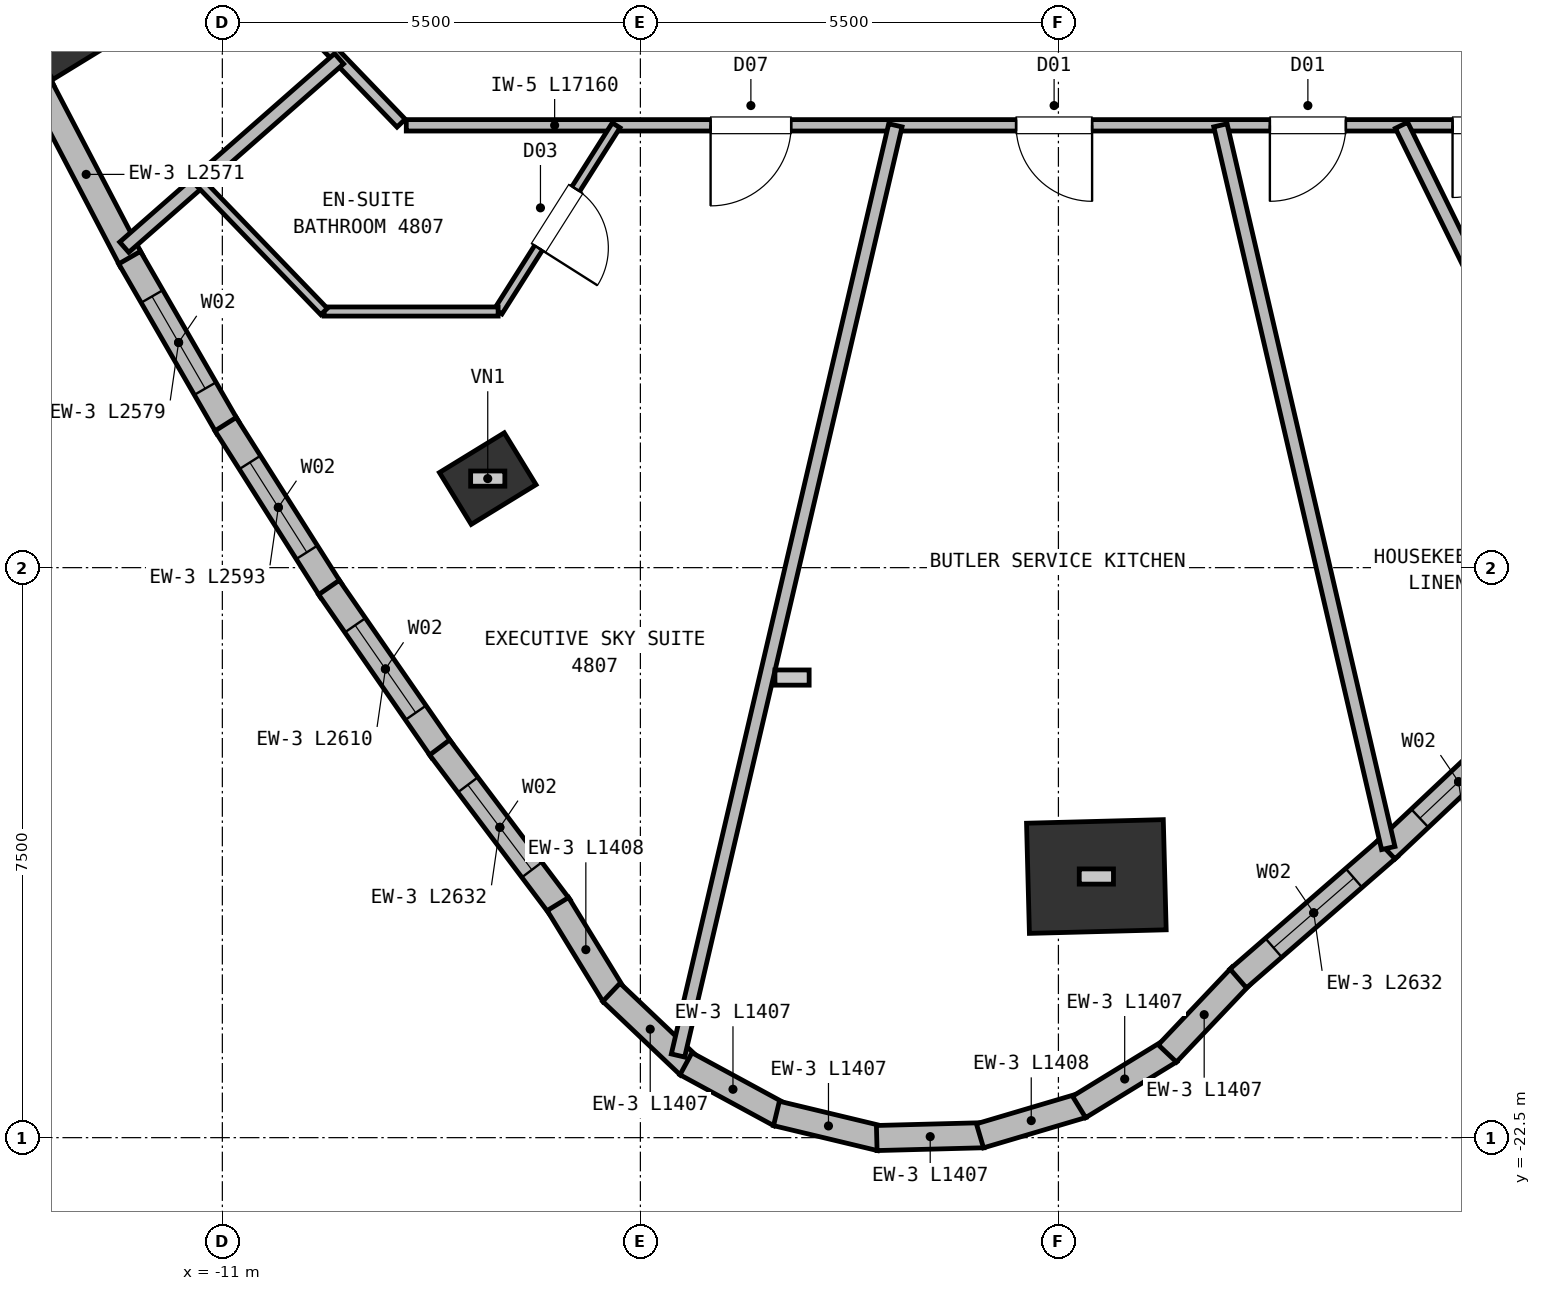
"""IFC4 building model, lengths in metres.
Left out: names, types, materials, properties, quantities, classifications, styles, units other than length and angle.
Written with IfcOpenShell. Run it as: python <this file> out.ifc"""

import sys

from ifc_helpers import new_model, si_unit, direction, frame, frame_2d, origin, origin_2d, place, context, subcontext, project, spatial, rectangle, extrude, element, fill, save


model = new_model("IFC4")
c1 = context("Model", 3, precision=1e-05, world=origin(), true_north=direction((0.0, 1.0)))
c2 = subcontext(c1, "Body", "Model", "MODEL_VIEW")
j1 = project(units=[si_unit("LENGTHUNIT", "METRE"), si_unit("PLANEANGLEUNIT", "RADIAN")], contexts=[c1])
p1 = place(None, origin())
s1 = spatial("IfcSite", under=j1, at=p1, CompositionType="ELEMENT")
p2 = place(p1, origin())
s2 = spatial("IfcBuilding", under=s1, at=p2, CompositionType="ELEMENT")
p3 = place(p2, frame((0.0, 0.0, 182.75)))
s3 = spatial("IfcBuildingStorey", under=s2, at=p3, CompositionType="ELEMENT", Elevation=182.75)
for number, where, z_axis, x_axis in (
    (1, (-13.012, -7.974, 0.0), (0.0, 0.0, 1.0), (-0.522, 0.853, 0.0)),
    (2, (-7.508, -13.828, 0.0), (0.0, 0.0, 1.0), (-0.522, 0.853, 0.0)),
):
    element("IfcColumn", number, at=place(p3, frame(where, z_axis=z_axis, x_axis=x_axis)), inside=s3, PredefinedType="COLUMN", context=c2, shape_type="SweptSolid", body=[
        extrude(rectangle(XDim=0.8, YDim=1.0, at=origin_2d()), origin(), (0.0, 0.0, 1.0), 3.8),
    ])
p4 = place(p3, frame((0.499, -19.064, 0.0), z_axis=(0.0, 0.0, 1.0), x_axis=(-0.026176948308, 0.999657324976, 0.0)))
e3 = element("IfcColumn", 3, at=p4, inside=s3, PredefinedType="COLUMN", context=c2, shape_type="SweptSolid", body=[
    extrude(rectangle(XDim=1.45, YDim=1.8, at=origin_2d()), origin(), (0.0, 0.0, 1.0), 3.8),
])
p5 = place(p3, frame((-13.365, -8.731, 0.0), z_axis=(0.0, 0.0, 1.0), x_axis=(-0.425774125911, 0.90482948322, 0.0)))
e4 = element("IfcWall", 4, at=p5, inside=s3, PredefinedType="SOLIDWALL", context=c2, shape_type="SweptSolid", body=[
    extrude(rectangle(XDim=2.566, YDim=0.33, at=frame_2d((1.283, 0.0))), origin(), (0.0, 0.0, 1.0), 3.55),
])
p6 = place(p3, frame((-12.196, -10.965, 0.0), z_axis=(0.0, 0.0, 1.0), x_axis=(-0.463361004434, 0.886169611062, 0.0)))
e5 = element("IfcWall", 5, at=p6, inside=s3, PredefinedType="SOLIDWALL", context=c2, shape_type="SweptSolid", body=[
    extrude(rectangle(XDim=2.571, YDim=0.33, at=frame_2d((1.285, 0.0))), origin(), (0.0, 0.0, 1.0), 3.55),
])
p7 = place(p3, frame((-10.931, -13.155, 0.0), z_axis=(0.0, 0.0, 1.0), x_axis=(-0.499875407217, 0.866097325513, 0.0)))
e6 = element("IfcWall", 6, at=p7, inside=s3, PredefinedType="SOLIDWALL", context=c2, shape_type="SweptSolid", body=[
    extrude(rectangle(XDim=2.579, YDim=0.33, at=frame_2d((1.29, 0.0))), origin(), (0.0, 0.0, 1.0), 3.55),
])
p8 = place(p7, frame((0.59, 0.0, 0.72)))
e7 = element("IfcOpeningElement", 7, at=p8, cuts=e6, PredefinedType="OPENING", context=c2, shape_type="SweptSolid", body=[
    extrude(rectangle(XDim=1.4, YDim=1.84, at=frame_2d((0.7, 0.92))), frame((0.0, 0.175, 0.0), z_axis=(0.0, -1.0, 0.0), x_axis=(1.0, 0.0, 0.0)), (0.0, 0.0, 1.0), 0.35),
])
p9 = place(p3, frame((-9.569, -15.302, 0.0), z_axis=(0.0, 0.0, 1.0), x_axis=(-0.535186500918, 0.844733928072, 0.0)))
e8 = element("IfcWall", 8, at=p9, inside=s3, PredefinedType="SOLIDWALL", context=c2, shape_type="SweptSolid", body=[
    extrude(rectangle(XDim=2.593, YDim=0.33, at=frame_2d((1.296, 0.0))), origin(), (0.0, 0.0, 1.0), 3.55),
])
p10 = place(p9, frame((0.596, 0.0, 0.72)))
e9 = element("IfcOpeningElement", 9, at=p10, cuts=e8, PredefinedType="OPENING", context=c2, shape_type="SweptSolid", body=[
    extrude(rectangle(XDim=1.4, YDim=1.84, at=frame_2d((0.7, 0.92))), frame((0.0, 0.175, 0.0), z_axis=(0.0, -1.0, 0.0), x_axis=(1.0, 0.0, 0.0)), (0.0, 0.0, 1.0), 0.35),
])
p11 = place(p3, frame((-8.112, -17.406, 0.0), z_axis=(0.0, 0.0, 1.0), x_axis=(-0.569122418308, 0.822252803571, 0.0)))
e10 = element("IfcWall", 10, at=p11, inside=s3, PredefinedType="SOLIDWALL", context=c2, shape_type="SweptSolid", body=[
    extrude(rectangle(XDim=2.61, YDim=0.33, at=frame_2d((1.305, 0.0))), origin(), (0.0, 0.0, 1.0), 3.55),
])
p12 = place(p11, frame((0.605, 0.0, 0.72)))
e11 = element("IfcOpeningElement", 11, at=p12, cuts=e10, PredefinedType="OPENING", context=c2, shape_type="SweptSolid", body=[
    extrude(rectangle(XDim=1.4, YDim=1.84, at=frame_2d((0.7, 0.92))), frame((0.0, 0.175, 0.0), z_axis=(0.0, -1.0, 0.0), x_axis=(1.0, 0.0, 0.0)), (0.0, 0.0, 1.0), 0.35),
])
p13 = place(p3, frame((-6.557, -19.468, 0.0), z_axis=(0.0, 0.0, 1.0), x_axis=(-0.601735324528, 0.798695561034, 0.0)))
e12 = element("IfcWall", 12, at=p13, inside=s3, PredefinedType="SOLIDWALL", context=c2, shape_type="SweptSolid", body=[
    extrude(rectangle(XDim=2.632, YDim=0.33, at=frame_2d((1.316, 0.0))), origin(), (0.0, 0.0, 1.0), 3.55),
])
p14 = place(p13, frame((0.616, 0.0, 0.72)))
e13 = element("IfcOpeningElement", 13, at=p14, cuts=e12, PredefinedType="OPENING", context=c2, shape_type="SweptSolid", body=[
    extrude(rectangle(XDim=1.4, YDim=1.84, at=frame_2d((0.7, 0.92))), frame((0.0, 0.175, 0.0), z_axis=(0.0, -1.0, 0.0), x_axis=(1.0, 0.0, 0.0)), (0.0, 0.0, 1.0), 0.35),
])
for number, where, z_axis, x_axis in (
    (14, (-5.85, -20.627, 0.0), (0.0, 0.0, 1.0), (-0.522, 0.853, 0.0)),
    (15, (-4.86, -21.557, 0.0), (0.0, 0.0, 1.0), (-0.725, 0.688, 0.0)),
):
    element("IfcWall", number, at=place(p3, frame(where, z_axis=z_axis, x_axis=x_axis)), inside=s3, PredefinedType="SOLIDWALL", context=c2, shape_type="SweptSolid", body=[
        extrude(rectangle(XDim=1.407, YDim=0.33, at=frame_2d((0.704, 0.0))), origin(), (0.0, 0.0, 1.0), 3.55),
    ])
p15 = place(p3, frame((-3.663, -22.199, 0.0), z_axis=(0.0, 0.0, 1.0), x_axis=(-0.878861744685, 0.477076549129, 0.0)))
e16 = element("IfcWall", 16, at=p15, inside=s3, PredefinedType="SOLIDWALL", context=c2, shape_type="SweptSolid", body=[
    extrude(rectangle(XDim=1.407, YDim=0.33, at=frame_2d((0.704, 0.0))), origin(), (0.0, 0.0, 1.0), 3.55),
])
for number, where, z_axis, x_axis in (
    (17, (-2.341, -22.51, 0.0), (0.0, 0.0, 1.0), (-0.972, 0.233, 0.0)),
    (18, (-0.983, -22.468, 0.0), (0.0, 0.0, 1.0), (-1.0, -0.026, 0.0)),
    (19, (0.317, -22.076, 0.0), (0.0, 0.0, 1.0), (-0.959, -0.284, 0.0)),
):
    element("IfcWall", number, at=place(p3, frame(where, z_axis=z_axis, x_axis=x_axis)), inside=s3, PredefinedType="SOLIDWALL", context=c2, shape_type="SweptSolid", body=[
        extrude(rectangle(XDim=1.407, YDim=0.33, at=frame_2d((0.704, 0.0))), origin(), (0.0, 0.0, 1.0), 3.55),
    ])
p16 = place(p3, frame((1.472, -21.361, 0.0), z_axis=(0.0, 0.0, 1.0), x_axis=(-0.852633662668, -0.522509174355, 0.0)))
e20 = element("IfcWall", 20, at=p16, inside=s3, PredefinedType="SOLIDWALL", context=c2, shape_type="SweptSolid", body=[
    extrude(rectangle(XDim=1.407, YDim=0.33, at=frame_2d((0.704, 0.0))), origin(), (0.0, 0.0, 1.0), 3.55),
])
p17 = place(p3, frame((2.402, -20.371, 0.0), z_axis=(0.0, 0.0, 1.0), x_axis=(-0.688302566146, -0.725423722687, 0.0)))
e21 = element("IfcWall", 21, at=p17, inside=s3, PredefinedType="SOLIDWALL", context=c2, shape_type="SweptSolid", body=[
    extrude(rectangle(XDim=1.407, YDim=0.33, at=frame_2d((0.704, 0.0))), origin(), (0.0, 0.0, 1.0), 3.55),
])
p18 = place(p3, frame((4.352, -18.679, 0.0), z_axis=(0.0, 0.0, 1.0), x_axis=(-0.754647459821, -0.656130483505, 0.0)))
e22 = element("IfcWall", 22, at=p18, inside=s3, PredefinedType="SOLIDWALL", context=c2, shape_type="SweptSolid", body=[
    extrude(rectangle(XDim=2.632, YDim=0.33, at=frame_2d((1.316, 0.0))), origin(), (0.0, 0.0, 1.0), 3.55),
])
p19 = place(p18, frame((0.616, 0.0, 0.72)))
e23 = element("IfcOpeningElement", 23, at=p19, cuts=e22, PredefinedType="OPENING", context=c2, shape_type="SweptSolid", body=[
    extrude(rectangle(XDim=1.4, YDim=1.84, at=frame_2d((0.7, 0.92))), frame((0.0, 0.175, 0.0), z_axis=(0.0, -1.0, 0.0), x_axis=(1.0, 0.0, 0.0)), (0.0, 0.0, 1.0), 0.35),
])
p20 = place(p3, frame((6.215, -16.922, 0.0), z_axis=(0.0, 0.0, 1.0), x_axis=(-0.72774946529, -0.685843069346, 0.0)))
e24 = element("IfcWall", 24, at=p20, inside=s3, PredefinedType="SOLIDWALL", context=c2, shape_type="SweptSolid", body=[
    extrude(rectangle(XDim=2.61, YDim=0.33, at=frame_2d((1.305, 0.0))), origin(), (0.0, 0.0, 1.0), 3.55),
])
p21 = place(p20, frame((0.605, 0.0, 0.72)))
e25 = element("IfcOpeningElement", 25, at=p21, cuts=e24, PredefinedType="OPENING", context=c2, shape_type="SweptSolid", body=[
    extrude(rectangle(XDim=1.4, YDim=1.84, at=frame_2d((0.7, 0.92))), frame((0.0, 0.175, 0.0), z_axis=(0.0, -1.0, 0.0), x_axis=(1.0, 0.0, 0.0)), (0.0, 0.0, 1.0), 0.35),
])
p22 = place(p3, frame((8.58, -9.18, 0.0), z_axis=(0.0, 0.0, 1.0), x_axis=(-1.0, 0.0, 0.0)))
e26 = element("IfcWall", 26, at=p22, inside=s3, PredefinedType="PARTITIONING", context=c2, shape_type="SweptSolid", body=[
    extrude(rectangle(XDim=17.16, YDim=0.15, at=frame_2d((8.58, 0.0))), origin(), (0.0, 0.0, 1.0), 3.23),
])
p23 = place(p22, frame((2.444, 0.0, 0.0)))
e27 = element("IfcOpeningElement", 27, at=p23, cuts=e26, PredefinedType="OPENING", context=c2, shape_type="SweptSolid", body=[
    extrude(rectangle(XDim=0.95, YDim=2.1, at=frame_2d((0.475, 1.05))), frame((0.0, 0.085, 0.0), z_axis=(0.0, -1.0, 0.0), x_axis=(1.0, 0.0, 0.0)), (0.0, 0.0, 1.0), 0.17),
])
p24 = place(p22, frame((4.798, 0.0, 0.0)))
e28 = element("IfcOpeningElement", 28, at=p24, cuts=e26, PredefinedType="OPENING", context=c2, shape_type="SweptSolid", body=[
    extrude(rectangle(XDim=1.0, YDim=2.15, at=frame_2d((0.5, 1.075))), frame((0.0, 0.085, 0.0), z_axis=(0.0, -1.0, 0.0), x_axis=(1.0, 0.0, 0.0)), (0.0, 0.0, 1.0), 0.17),
])
p25 = place(p22, frame((12.096, 0.0, 0.0)))
e29 = element("IfcOpeningElement", 29, at=p25, cuts=e26, PredefinedType="OPENING", context=c2, shape_type="SweptSolid", body=[
    extrude(rectangle(XDim=1.06, YDim=2.15, at=frame_2d((0.53, 1.075))), frame((0.0, 0.085, 0.0), z_axis=(0.0, -1.0, 0.0), x_axis=(1.0, 0.0, 0.0)), (0.0, 0.0, 1.0), 0.17),
])
p26 = place(p22, frame((8.137, 0.0, 0.0)))
e30 = element("IfcOpeningElement", 30, at=p26, cuts=e26, PredefinedType="OPENING", context=c2, shape_type="SweptSolid", body=[
    extrude(rectangle(XDim=1.0, YDim=2.15, at=frame_2d((0.5, 1.075))), frame((0.0, 0.085, 0.0), z_axis=(0.0, -1.0, 0.0), x_axis=(1.0, 0.0, 0.0)), (0.0, 0.0, 1.0), 0.17),
])
p27 = place(p3, frame((-8.648, -9.151, 0.0), z_axis=(0.0, 0.0, 1.0), x_axis=(-0.693764562202, 0.720201869085, 0.0)))
e31 = element("IfcWall", 31, at=p27, inside=s3, PredefinedType="PARTITIONING", context=c2, shape_type="SweptSolid", body=[
    extrude(rectangle(XDim=2.558, YDim=0.15, at=frame_2d((1.279, 0.0))), origin(), (0.0, 0.0, 1.0), 3.23),
])
p28 = place(p3, frame((-9.464, -8.304, 0.0), z_axis=(0.0, 0.0, 1.0), x_axis=(-0.751699255643, -0.659506049302, 0.0)))
e32 = element("IfcWall", 32, at=p28, inside=s3, PredefinedType="PARTITIONING", context=c2, shape_type="SweptSolid", body=[
    extrude(rectangle(XDim=3.76, YDim=0.18, at=frame_2d((1.88, 0.0))), origin(), (0.0, 0.0, 1.0), 3.55),
])
p29 = place(p3, frame((-5.819, -9.18, 0.0), z_axis=(0.0, 0.0, 1.0), x_axis=(-0.535382431743, -0.844609763015, 0.0)))
e33 = element("IfcWall", 33, at=p29, inside=s3, PredefinedType="PARTITIONING", context=c2, shape_type="SweptSolid", body=[
    extrude(rectangle(XDim=2.901, YDim=0.12, at=frame_2d((1.45, 0.0))), origin(), (0.0, 0.0, 1.0), 3.55),
])
p30 = place(p29, frame((0.99, 0.0, 0.0)))
e34 = element("IfcOpeningElement", 34, at=p30, cuts=e33, PredefinedType="OPENING", context=c2, shape_type="SweptSolid", body=[
    extrude(rectangle(XDim=0.92, YDim=2.1, at=frame_2d((0.46, 1.05))), frame((0.0, 0.07, 0.0), z_axis=(0.0, -1.0, 0.0), x_axis=(1.0, 0.0, 0.0)), (0.0, 0.0, 1.0), 0.14),
])
p31 = place(p3, frame((-7.372, -11.63, 0.0), z_axis=(0.0, 0.0, 1.0), x_axis=(-1.0, 0.0, 0.0)))
e35 = element("IfcWall", 35, at=p31, inside=s3, PredefinedType="PARTITIONING", context=c2, shape_type="SweptSolid", body=[
    extrude(rectangle(XDim=2.29, YDim=0.12, at=frame_2d((1.145, 0.0))), origin(), (0.0, 0.0, 1.0), 3.55),
])
p32 = place(p3, frame((-11.308, -9.921, 0.0), z_axis=(0.0, 0.0, 1.0), x_axis=(0.693706945125, -0.7202573667, 0.0)))
e36 = element("IfcWall", 36, at=p32, inside=s3, PredefinedType="PARTITIONING", context=c2, shape_type="SweptSolid", body=[
    extrude(rectangle(XDim=2.372, YDim=0.12, at=frame_2d((1.186, 0.0))), origin(), (0.0, 0.0, 1.0), 2.63),
])
p33 = place(p3, frame((-2.145, -9.18, 0.0), z_axis=(0.0, 0.0, 1.0), x_axis=(-0.22755258656, -0.973765793376, 0.0)))
e37 = element("IfcWall", 37, at=p33, inside=s3, PredefinedType="PARTITIONING", context=c2, shape_type="SweptSolid", body=[
    extrude(rectangle(XDim=12.569, YDim=0.18, at=frame_2d((6.285, 0.0))), origin(), (0.0, 0.0, 1.0), 3.55),
])
p34 = place(p3, frame((2.132, -9.18, 0.0), z_axis=(0.0, 0.0, 1.0), x_axis=(0.226196232917, -0.974081754379, 0.0)))
e38 = element("IfcWall", 38, at=p34, inside=s3, PredefinedType="PARTITIONING", context=c2, shape_type="SweptSolid", body=[
    extrude(rectangle(XDim=9.762, YDim=0.18, at=frame_2d((4.881, 0.0))), origin(), (0.0, 0.0, 1.0), 3.55),
])
p35 = place(p3, frame((4.514, -9.18, 0.0), z_axis=(0.0, 0.0, 1.0), x_axis=(0.441285267702, -0.897366877319, 0.0)))
e39 = element("IfcWall", 39, at=p35, inside=s3, PredefinedType="PARTITIONING", context=c2, shape_type="SweptSolid", body=[
    extrude(rectangle(XDim=7.029, YDim=0.18, at=frame_2d((3.515, 0.0))), origin(), (0.0, 0.0, 1.0), 3.55),
])
p36 = place(p8, origin())
e40 = element("IfcWindow", 40, at=p36, inside=s3, PartitioningType="SINGLE_PANEL", PredefinedType="WINDOW", context=c2, shape_type="SweptSolid", body=[
    extrude(rectangle(XDim=1.4, YDim=1.84, at=frame_2d((0.7, 0.92))), frame((0.0, 0.03, 0.0), z_axis=(0.0, -1.0, 0.0), x_axis=(1.0, 0.0, 0.0)), (0.0, 0.0, 1.0), 0.06),
])
fill(e7, e40)
p37 = place(p10, origin())
e41 = element("IfcWindow", 41, at=p37, inside=s3, PartitioningType="SINGLE_PANEL", PredefinedType="WINDOW", context=c2, shape_type="SweptSolid", body=[
    extrude(rectangle(XDim=1.4, YDim=1.84, at=frame_2d((0.7, 0.92))), frame((0.0, 0.03, 0.0), z_axis=(0.0, -1.0, 0.0), x_axis=(1.0, 0.0, 0.0)), (0.0, 0.0, 1.0), 0.06),
])
fill(e9, e41)
p38 = place(p12, origin())
e42 = element("IfcWindow", 42, at=p38, inside=s3, PartitioningType="SINGLE_PANEL", PredefinedType="WINDOW", context=c2, shape_type="SweptSolid", body=[
    extrude(rectangle(XDim=1.4, YDim=1.84, at=frame_2d((0.7, 0.92))), frame((0.0, 0.03, 0.0), z_axis=(0.0, -1.0, 0.0), x_axis=(1.0, 0.0, 0.0)), (0.0, 0.0, 1.0), 0.06),
])
fill(e11, e42)
p39 = place(p14, origin())
e43 = element("IfcWindow", 43, at=p39, inside=s3, PartitioningType="SINGLE_PANEL", PredefinedType="WINDOW", context=c2, shape_type="SweptSolid", body=[
    extrude(rectangle(XDim=1.4, YDim=1.84, at=frame_2d((0.7, 0.92))), frame((0.0, 0.03, 0.0), z_axis=(0.0, -1.0, 0.0), x_axis=(1.0, 0.0, 0.0)), (0.0, 0.0, 1.0), 0.06),
])
fill(e13, e43)
p40 = place(p19, origin())
e44 = element("IfcWindow", 44, at=p40, inside=s3, PartitioningType="SINGLE_PANEL", PredefinedType="WINDOW", context=c2, shape_type="SweptSolid", body=[
    extrude(rectangle(XDim=1.4, YDim=1.84, at=frame_2d((0.7, 0.92))), frame((0.0, 0.03, 0.0), z_axis=(0.0, -1.0, 0.0), x_axis=(1.0, 0.0, 0.0)), (0.0, 0.0, 1.0), 0.06),
])
fill(e23, e44)
p41 = place(p21, origin())
e45 = element("IfcWindow", 45, at=p41, inside=s3, PartitioningType="SINGLE_PANEL", PredefinedType="WINDOW", context=c2, shape_type="SweptSolid", body=[
    extrude(rectangle(XDim=1.4, YDim=1.84, at=frame_2d((0.7, 0.92))), frame((0.0, 0.03, 0.0), z_axis=(0.0, -1.0, 0.0), x_axis=(1.0, 0.0, 0.0)), (0.0, 0.0, 1.0), 0.06),
])
fill(e25, e45)
p42 = place(p30, origin())
e46 = element("IfcDoor", 46, at=p42, inside=s3, OperationType="SINGLE_SWING_RIGHT", PredefinedType="DOOR", context=c2, shape_type="SweptSolid", body=[
    extrude(rectangle(XDim=0.92, YDim=2.1, at=frame_2d((0.46, 1.05))), frame((0.0, 0.025, 0.0), z_axis=(0.0, -1.0, 0.0), x_axis=(1.0, 0.0, 0.0)), (0.0, 0.0, 1.0), 0.05),
])
fill(e34, e46)
p43 = place(p23, origin())
e47 = element("IfcDoor", 47, at=p43, inside=s3, OperationType="SINGLE_SWING_RIGHT", PredefinedType="DOOR", context=c2, shape_type="SweptSolid", body=[
    extrude(rectangle(XDim=0.95, YDim=2.1, at=frame_2d((0.475, 1.05))), frame((0.0, 0.025, 0.0), z_axis=(0.0, -1.0, 0.0), x_axis=(1.0, 0.0, 0.0)), (0.0, 0.0, 1.0), 0.05),
])
fill(e27, e47)
p44 = place(p24, origin())
e48 = element("IfcDoor", 48, at=p44, inside=s3, OperationType="SINGLE_SWING_RIGHT", PredefinedType="DOOR", context=c2, shape_type="SweptSolid", body=[
    extrude(rectangle(XDim=1.0, YDim=2.15, at=frame_2d((0.5, 1.075))), frame((0.0, 0.025, 0.0), z_axis=(0.0, -1.0, 0.0), x_axis=(1.0, 0.0, 0.0)), (0.0, 0.0, 1.0), 0.05),
])
fill(e28, e48)
p45 = place(p25, origin())
e49 = element("IfcDoor", 49, at=p45, inside=s3, OperationType="SINGLE_SWING_RIGHT", PredefinedType="DOOR", context=c2, shape_type="SweptSolid", body=[
    extrude(rectangle(XDim=1.06, YDim=2.15, at=frame_2d((0.53, 1.075))), frame((0.0, 0.025, 0.0), z_axis=(0.0, -1.0, 0.0), x_axis=(1.0, 0.0, 0.0)), (0.0, 0.0, 1.0), 0.05),
])
fill(e29, e49)
p46 = place(p26, origin())
e50 = element("IfcDoor", 50, at=p46, inside=s3, OperationType="SINGLE_SWING_LEFT", PredefinedType="DOOR", context=c2, shape_type="SweptSolid", body=[
    extrude(rectangle(XDim=1.0, YDim=2.15, at=frame_2d((0.5, 1.075))), frame((0.0, 0.025, 0.0), z_axis=(0.0, -1.0, 0.0), x_axis=(1.0, 0.0, 0.0)), (0.0, 0.0, 1.0), 0.05),
])
fill(e30, e50)
save(model, sys.argv[1])
